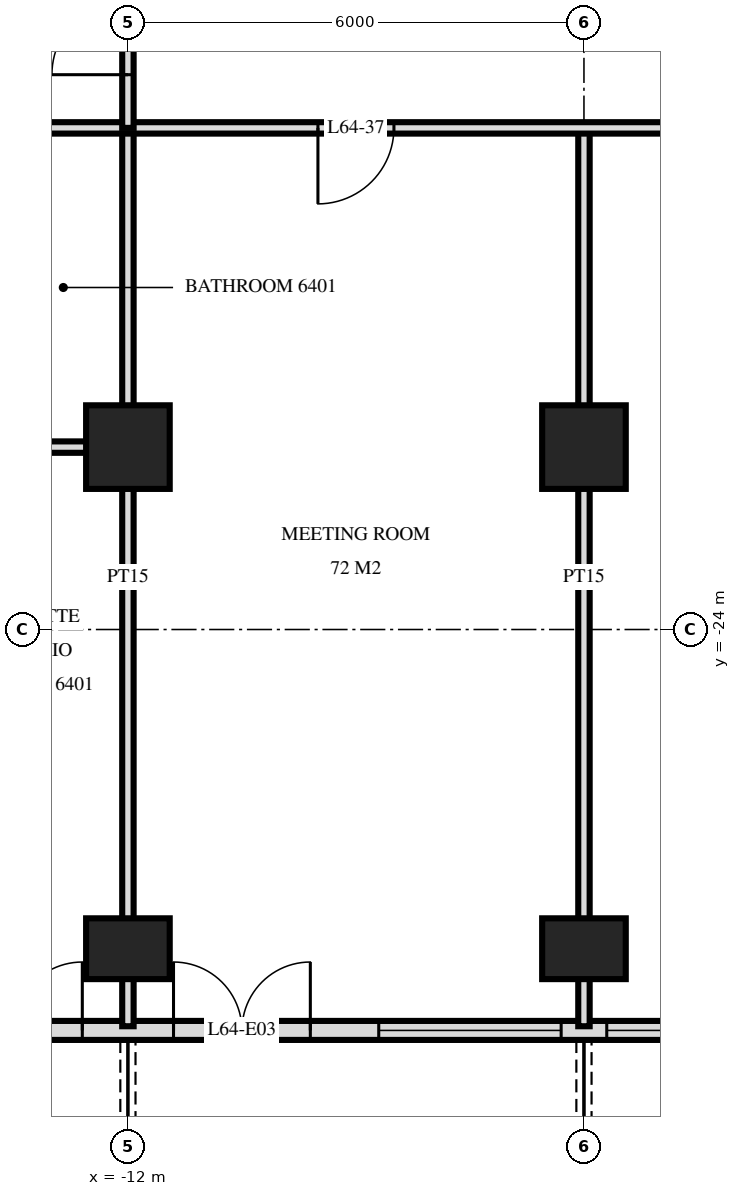
"""IFC4 building model, lengths in metres.
Left out: names, types, materials, properties, quantities, classifications, styles, units other than length and angle.
Written with IfcOpenShell. Run it as: python <this file> out.ifc"""

import sys

from ifc_helpers import new_model, si_unit, direction, frame, frame_2d, origin, origin_2d, place, context, subcontext, project, spatial, rectangle, extrude, element, fill, save


model = new_model("IFC4")
c1 = context("Model", 3, precision=1e-05, world=origin(), true_north=direction((0.0, 1.0)))
c2 = subcontext(c1, "Body", "Model", "MODEL_VIEW")
j1 = project(units=[si_unit("LENGTHUNIT", "METRE"), si_unit("PLANEANGLEUNIT", "RADIAN")], contexts=[c1])
p1 = place(None, origin())
s1 = spatial("IfcSite", under=j1, at=p1, CompositionType="ELEMENT")
p2 = place(p1, origin())
s2 = spatial("IfcBuilding", under=s1, at=p2, CompositionType="ELEMENT")
p3 = place(p2, frame((0.0, 0.0, 243.1)))
s3 = spatial("IfcBuildingStorey", under=s2, at=p3, CompositionType="ELEMENT", Elevation=243.1)
p4 = place(p3, frame((-12.0, -28.2, 0.0), z_axis=(0.0, 0.0, 1.0), x_axis=(1.0, 0.0, 0.0)))
e1 = element("IfcColumn", 1, at=p4, inside=s3, PredefinedType="COLUMN", context=c2, shape_type="SweptSolid", body=[
    extrude(rectangle(XDim=1.1, YDim=0.8, at=origin_2d()), origin(), (0.0, 0.0, 1.0), 3.5),
])
p5 = place(p3, frame((-12.0, -21.6, 0.0), z_axis=(0.0, 0.0, 1.0), x_axis=(1.0, 0.0, 0.0)))
e2 = element("IfcColumn", 2, at=p5, inside=s3, PredefinedType="COLUMN", context=c2, shape_type="SweptSolid", body=[
    extrude(rectangle(XDim=1.1, YDim=1.1, at=origin_2d()), origin(), (0.0, 0.0, 1.0), 3.5),
])
p6 = place(p3, frame((-6.0, -28.2, 0.0), z_axis=(0.0, 0.0, 1.0), x_axis=(1.0, 0.0, 0.0)))
e3 = element("IfcColumn", 3, at=p6, inside=s3, PredefinedType="COLUMN", context=c2, shape_type="SweptSolid", body=[
    extrude(rectangle(XDim=1.1, YDim=0.8, at=origin_2d()), origin(), (0.0, 0.0, 1.0), 3.5),
])
p7 = place(p3, frame((-6.0, -21.6, 0.0), z_axis=(0.0, 0.0, 1.0), x_axis=(1.0, 0.0, 0.0)))
e4 = element("IfcColumn", 4, at=p7, inside=s3, PredefinedType="COLUMN", context=c2, shape_type="SweptSolid", body=[
    extrude(rectangle(XDim=1.1, YDim=1.1, at=origin_2d()), origin(), (0.0, 0.0, 1.0), 3.5),
])
p8 = place(p3, frame((-22.475, -29.275, 0.0), z_axis=(0.0, 0.0, 1.0), x_axis=(1.0, 0.0, 0.0)))
e5 = element("IfcWall", 5, at=p8, inside=s3, PredefinedType="SOLIDWALL", context=c2, shape_type="SweptSolid", body=[
    extrude(rectangle(XDim=44.951, YDim=0.25, at=frame_2d((22.475, 0.0))), origin(), (0.0, 0.0, 1.0), 3.2),
])
p9 = place(p8, frame((0.575, 0.0, 0.0)))
e6 = element("IfcOpeningElement", 6, at=p9, cuts=e5, PredefinedType="OPENING", context=c2, shape_type="SweptSolid", body=[
    extrude(rectangle(XDim=1.8, YDim=2.4, at=frame_2d((0.9, 1.2))), frame((0.0, 0.135, 0.0), z_axis=(0.0, -1.0, 0.0), x_axis=(1.0, 0.0, 0.0)), (0.0, 0.0, 1.0), 0.27),
])
p10 = place(p8, frame((4.775, 0.0, 0.9)))
e7 = element("IfcOpeningElement", 7, at=p10, cuts=e5, PredefinedType="OPENING", context=c2, shape_type="SweptSolid", body=[
    extrude(rectangle(XDim=2.4, YDim=1.5, at=frame_2d((1.2, 0.75))), frame((0.0, 0.135, 0.0), z_axis=(0.0, -1.0, 0.0), x_axis=(1.0, 0.0, 0.0)), (0.0, 0.0, 1.0), 0.27),
])
p11 = place(p8, frame((8.075, 0.0, 0.0)))
e8 = element("IfcOpeningElement", 8, at=p11, cuts=e5, PredefinedType="OPENING", context=c2, shape_type="SweptSolid", body=[
    extrude(rectangle(XDim=1.8, YDim=2.4, at=frame_2d((0.9, 1.2))), frame((0.0, 0.135, 0.0), z_axis=(0.0, -1.0, 0.0), x_axis=(1.0, 0.0, 0.0)), (0.0, 0.0, 1.0), 0.27),
])
p12 = place(p8, frame((11.075, 0.0, 0.0)))
e9 = element("IfcOpeningElement", 9, at=p12, cuts=e5, PredefinedType="OPENING", context=c2, shape_type="SweptSolid", body=[
    extrude(rectangle(XDim=1.8, YDim=2.4, at=frame_2d((0.9, 1.2))), frame((0.0, 0.135, 0.0), z_axis=(0.0, -1.0, 0.0), x_axis=(1.0, 0.0, 0.0)), (0.0, 0.0, 1.0), 0.27),
])
p13 = place(p8, frame((13.775, 0.0, 0.9)))
e10 = element("IfcOpeningElement", 10, at=p13, cuts=e5, PredefinedType="OPENING", context=c2, shape_type="SweptSolid", body=[
    extrude(rectangle(XDim=2.4, YDim=1.5, at=frame_2d((1.2, 0.75))), frame((0.0, 0.135, 0.0), z_axis=(0.0, -1.0, 0.0), x_axis=(1.0, 0.0, 0.0)), (0.0, 0.0, 1.0), 0.27),
])
p14 = place(p8, frame((16.775, 0.0, 0.9)))
e11 = element("IfcOpeningElement", 11, at=p14, cuts=e5, PredefinedType="OPENING", context=c2, shape_type="SweptSolid", body=[
    extrude(rectangle(XDim=2.4, YDim=1.5, at=frame_2d((1.2, 0.75))), frame((0.0, 0.135, 0.0), z_axis=(0.0, -1.0, 0.0), x_axis=(1.0, 0.0, 0.0)), (0.0, 0.0, 1.0), 0.27),
])
p15 = place(p8, frame((20.075, 0.0, 0.0)))
e12 = element("IfcOpeningElement", 12, at=p15, cuts=e5, PredefinedType="OPENING", context=c2, shape_type="SweptSolid", body=[
    extrude(rectangle(XDim=1.8, YDim=2.4, at=frame_2d((0.9, 1.2))), frame((0.0, 0.135, 0.0), z_axis=(0.0, -1.0, 0.0), x_axis=(1.0, 0.0, 0.0)), (0.0, 0.0, 1.0), 0.27),
])
p16 = place(p8, frame((23.075, 0.0, 0.0)))
e13 = element("IfcOpeningElement", 13, at=p16, cuts=e5, PredefinedType="OPENING", context=c2, shape_type="SweptSolid", body=[
    extrude(rectangle(XDim=1.8, YDim=2.4, at=frame_2d((0.9, 1.2))), frame((0.0, 0.135, 0.0), z_axis=(0.0, -1.0, 0.0), x_axis=(1.0, 0.0, 0.0)), (0.0, 0.0, 1.0), 0.27),
])
p17 = place(p8, frame((25.775, 0.0, 0.9)))
e14 = element("IfcOpeningElement", 14, at=p17, cuts=e5, PredefinedType="OPENING", context=c2, shape_type="SweptSolid", body=[
    extrude(rectangle(XDim=2.4, YDim=1.5, at=frame_2d((1.2, 0.75))), frame((0.0, 0.135, 0.0), z_axis=(0.0, -1.0, 0.0), x_axis=(1.0, 0.0, 0.0)), (0.0, 0.0, 1.0), 0.27),
])
p18 = place(p8, frame((29.075, 0.0, 0.0)))
e15 = element("IfcOpeningElement", 15, at=p18, cuts=e5, PredefinedType="OPENING", context=c2, shape_type="SweptSolid", body=[
    extrude(rectangle(XDim=1.8, YDim=2.4, at=frame_2d((0.9, 1.2))), frame((0.0, 0.135, 0.0), z_axis=(0.0, -1.0, 0.0), x_axis=(1.0, 0.0, 0.0)), (0.0, 0.0, 1.0), 0.27),
])
p19 = place(p8, frame((31.775, 0.0, 0.9)))
e16 = element("IfcOpeningElement", 16, at=p19, cuts=e5, PredefinedType="OPENING", context=c2, shape_type="SweptSolid", body=[
    extrude(rectangle(XDim=2.4, YDim=1.5, at=frame_2d((1.2, 0.75))), frame((0.0, 0.135, 0.0), z_axis=(0.0, -1.0, 0.0), x_axis=(1.0, 0.0, 0.0)), (0.0, 0.0, 1.0), 0.27),
])
p20 = place(p8, frame((35.075, 0.0, 0.0)))
e17 = element("IfcOpeningElement", 17, at=p20, cuts=e5, PredefinedType="OPENING", context=c2, shape_type="SweptSolid", body=[
    extrude(rectangle(XDim=1.8, YDim=2.4, at=frame_2d((0.9, 1.2))), frame((0.0, 0.135, 0.0), z_axis=(0.0, -1.0, 0.0), x_axis=(1.0, 0.0, 0.0)), (0.0, 0.0, 1.0), 0.27),
])
p21 = place(p8, frame((41.075, 0.0, 0.0)))
e18 = element("IfcOpeningElement", 18, at=p21, cuts=e5, PredefinedType="OPENING", context=c2, shape_type="SweptSolid", body=[
    extrude(rectangle(XDim=1.8, YDim=2.4, at=frame_2d((0.9, 1.2))), frame((0.0, 0.135, 0.0), z_axis=(0.0, -1.0, 0.0), x_axis=(1.0, 0.0, 0.0)), (0.0, 0.0, 1.0), 0.27),
])
p22 = place(p3, frame((-6.0, -29.22, 0.0), z_axis=(0.0, 0.0, 1.0), x_axis=(0.0, 1.0, 0.0)))
e19 = element("IfcWall", 19, at=p22, inside=s3, PredefinedType="PARTITIONING", context=c2, shape_type="SweptSolid", body=[
    extrude(rectangle(XDim=11.82, YDim=0.15, at=frame_2d((5.91, 0.0))), origin(), (0.0, 0.0, 1.0), 3.22),
])
p23 = place(p3, frame((-12.0, -17.4, 0.0), z_axis=(0.0, 0.0, 1.0), x_axis=(0.0, 1.0, 0.0)))
e20 = element("IfcWall", 20, at=p23, inside=s3, PredefinedType="PARTITIONING", context=c2, shape_type="SweptSolid", body=[
    extrude(rectangle(XDim=2.35, YDim=0.15, at=frame_2d((1.175, 0.0))), origin(), (0.0, 0.0, 1.0), 3.22),
])
p24 = place(p23, frame((0.7, 0.0, 0.0)))
e21 = element("IfcOpeningElement", 21, at=p24, cuts=e20, PredefinedType="OPENING", context=c2, shape_type="SweptSolid", body=[
    extrude(rectangle(XDim=1.0, YDim=2.1, at=frame_2d((0.5, 1.05))), frame((0.0, 0.085, 0.0), z_axis=(0.0, -1.0, 0.0), x_axis=(1.0, 0.0, 0.0)), (0.0, 0.0, 1.0), 0.17),
])
p25 = place(p3, frame((-12.0, -29.22, 0.0), z_axis=(0.0, 0.0, 1.0), x_axis=(0.0, 1.0, 0.0)))
e22 = element("IfcWall", 22, at=p25, inside=s3, PredefinedType="PARTITIONING", context=c2, shape_type="SweptSolid", body=[
    extrude(rectangle(XDim=11.82, YDim=0.15, at=frame_2d((5.91, 0.0))), origin(), (0.0, 0.0, 1.0), 3.22),
])
p26 = place(p3, frame((-13.7, -21.6, 0.0), z_axis=(0.0, 0.0, 1.0), x_axis=(1.0, 0.0, 0.0)))
e23 = element("IfcWall", 23, at=p26, inside=s3, PredefinedType="PARTITIONING", context=c2, shape_type="SweptSolid", body=[
    extrude(rectangle(XDim=1.7, YDim=0.15, at=frame_2d((0.85, 0.0))), origin(), (0.0, 0.0, 1.0), 3.22),
])
p27 = place(p3, frame((-26.82, -17.4, 0.0), z_axis=(0.0, 0.0, 1.0), x_axis=(1.0, 0.0, 0.0)))
e24 = element("IfcWall", 24, at=p27, inside=s3, PredefinedType="PARTITIONING", context=c2, shape_type="SweptSolid", body=[
    extrude(rectangle(XDim=53.64, YDim=0.15, at=frame_2d((26.82, 0.0))), origin(), (0.0, 0.0, 1.0), 3.22),
])
p28 = place(p27, frame((11.97, 0.0, 0.0)))
e25 = element("IfcOpeningElement", 25, at=p28, cuts=e24, PredefinedType="OPENING", context=c2, shape_type="SweptSolid", body=[
    extrude(rectangle(XDim=1.0, YDim=2.1, at=frame_2d((0.5, 1.05))), frame((0.0, 0.085, 0.0), z_axis=(0.0, -1.0, 0.0), x_axis=(1.0, 0.0, 0.0)), (0.0, 0.0, 1.0), 0.17),
])
p29 = place(p27, frame((3.92, 0.0, 0.0)))
e26 = element("IfcOpeningElement", 26, at=p29, cuts=e24, PredefinedType="OPENING", context=c2, shape_type="SweptSolid", body=[
    extrude(rectangle(XDim=1.0, YDim=2.1, at=frame_2d((0.5, 1.05))), frame((0.0, 0.085, 0.0), z_axis=(0.0, -1.0, 0.0), x_axis=(1.0, 0.0, 0.0)), (0.0, 0.0, 1.0), 0.17),
])
p30 = place(p27, frame((5.72, 0.0, 0.0)))
e27 = element("IfcOpeningElement", 27, at=p30, cuts=e24, PredefinedType="OPENING", context=c2, shape_type="SweptSolid", body=[
    extrude(rectangle(XDim=1.0, YDim=2.1, at=frame_2d((0.5, 1.05))), frame((0.0, 0.085, 0.0), z_axis=(0.0, -1.0, 0.0), x_axis=(1.0, 0.0, 0.0)), (0.0, 0.0, 1.0), 0.17),
])
p31 = place(p27, frame((47.72, 0.0, 0.0)))
e28 = element("IfcOpeningElement", 28, at=p31, cuts=e24, PredefinedType="OPENING", context=c2, shape_type="SweptSolid", body=[
    extrude(rectangle(XDim=1.0, YDim=2.1, at=frame_2d((0.5, 1.05))), frame((0.0, 0.085, 0.0), z_axis=(0.0, -1.0, 0.0), x_axis=(1.0, 0.0, 0.0)), (0.0, 0.0, 1.0), 0.17),
])
p32 = place(p27, frame((51.02, 0.0, 0.0)))
e29 = element("IfcOpeningElement", 29, at=p32, cuts=e24, PredefinedType="OPENING", context=c2, shape_type="SweptSolid", body=[
    extrude(rectangle(XDim=1.0, YDim=2.1, at=frame_2d((0.5, 1.05))), frame((0.0, 0.085, 0.0), z_axis=(0.0, -1.0, 0.0), x_axis=(1.0, 0.0, 0.0)), (0.0, 0.0, 1.0), 0.17),
])
p33 = place(p27, frame((17.32, 0.0, 0.0)))
e30 = element("IfcOpeningElement", 30, at=p33, cuts=e24, PredefinedType="OPENING", context=c2, shape_type="SweptSolid", body=[
    extrude(rectangle(XDim=1.0, YDim=2.1, at=frame_2d((0.5, 1.05))), frame((0.0, 0.085, 0.0), z_axis=(0.0, -1.0, 0.0), x_axis=(1.0, 0.0, 0.0)), (0.0, 0.0, 1.0), 0.17),
])
p34 = place(p27, frame((23.32, 0.0, 0.0)))
e31 = element("IfcOpeningElement", 31, at=p34, cuts=e24, PredefinedType="OPENING", context=c2, shape_type="SweptSolid", body=[
    extrude(rectangle(XDim=1.0, YDim=2.1, at=frame_2d((0.5, 1.05))), frame((0.0, 0.085, 0.0), z_axis=(0.0, -1.0, 0.0), x_axis=(1.0, 0.0, 0.0)), (0.0, 0.0, 1.0), 0.17),
])
p35 = place(p27, frame((29.32, 0.0, 0.0)))
e32 = element("IfcOpeningElement", 32, at=p35, cuts=e24, PredefinedType="OPENING", context=c2, shape_type="SweptSolid", body=[
    extrude(rectangle(XDim=1.0, YDim=2.1, at=frame_2d((0.5, 1.05))), frame((0.0, 0.085, 0.0), z_axis=(0.0, -1.0, 0.0), x_axis=(1.0, 0.0, 0.0)), (0.0, 0.0, 1.0), 0.17),
])
p36 = place(p27, frame((35.32, 0.0, 0.0)))
e33 = element("IfcOpeningElement", 33, at=p36, cuts=e24, PredefinedType="OPENING", context=c2, shape_type="SweptSolid", body=[
    extrude(rectangle(XDim=1.0, YDim=2.1, at=frame_2d((0.5, 1.05))), frame((0.0, 0.085, 0.0), z_axis=(0.0, -1.0, 0.0), x_axis=(1.0, 0.0, 0.0)), (0.0, 0.0, 1.0), 0.17),
])
p37 = place(p11, origin())
e34 = element("IfcDoor", 34, at=p37, inside=s3, OperationType="DOUBLE_DOOR_SINGLE_SWING", PredefinedType="DOOR", context=c2, shape_type="SweptSolid", body=[
    extrude(rectangle(XDim=1.8, YDim=2.4, at=frame_2d((0.9, 1.2))), frame((0.0, 0.025, 0.0), z_axis=(0.0, -1.0, 0.0), x_axis=(1.0, 0.0, 0.0)), (0.0, 0.0, 1.0), 0.05),
])
fill(e8, e34)
p38 = place(p12, origin())
e35 = element("IfcDoor", 35, at=p38, inside=s3, OperationType="DOUBLE_DOOR_SINGLE_SWING", PredefinedType="DOOR", context=c2, shape_type="SweptSolid", body=[
    extrude(rectangle(XDim=1.8, YDim=2.4, at=frame_2d((0.9, 1.2))), frame((0.0, 0.025, 0.0), z_axis=(0.0, -1.0, 0.0), x_axis=(1.0, 0.0, 0.0)), (0.0, 0.0, 1.0), 0.05),
])
fill(e9, e35)
p39 = place(p13, origin())
e36 = element("IfcWindow", 36, at=p39, inside=s3, PartitioningType="SINGLE_PANEL", PredefinedType="WINDOW", context=c2, shape_type="SweptSolid", body=[
    extrude(rectangle(XDim=2.4, YDim=1.5, at=frame_2d((1.2, 0.75))), frame((0.0, 0.03, 0.0), z_axis=(0.0, -1.0, 0.0), x_axis=(1.0, 0.0, 0.0)), (0.0, 0.0, 1.0), 0.06),
])
fill(e10, e36)
p40 = place(p14, origin())
e37 = element("IfcWindow", 37, at=p40, inside=s3, PartitioningType="SINGLE_PANEL", PredefinedType="WINDOW", context=c2, shape_type="SweptSolid", body=[
    extrude(rectangle(XDim=2.4, YDim=1.5, at=frame_2d((1.2, 0.75))), frame((0.0, 0.03, 0.0), z_axis=(0.0, -1.0, 0.0), x_axis=(1.0, 0.0, 0.0)), (0.0, 0.0, 1.0), 0.06),
])
fill(e11, e37)
p41 = place(p24, origin())
e38 = element("IfcDoor", 38, at=p41, inside=s3, OperationType="SINGLE_SWING_RIGHT", PredefinedType="DOOR", context=c2, shape_type="SweptSolid", body=[
    extrude(rectangle(XDim=1.0, YDim=2.1, at=frame_2d((0.5, 1.05))), frame((0.0, 0.025, 0.0), z_axis=(0.0, -1.0, 0.0), x_axis=(1.0, 0.0, 0.0)), (0.0, 0.0, 1.0), 0.05),
])
fill(e21, e38)
p42 = place(p33, frame((0.5, 0.0, 0.0), z_axis=(0.0, 0.0, 1.0), x_axis=(-1.0, 0.0, 0.0)))
e39 = element("IfcDoor", 39, at=p42, inside=s3, OperationType="SINGLE_SWING_LEFT", PredefinedType="DOOR", context=c2, shape_type="SweptSolid", body=[
    extrude(rectangle(XDim=1.0, YDim=2.1, at=frame_2d((0.0, 1.05))), frame((0.0, -0.025, 0.0), z_axis=(0.0, 1.0, 0.0), x_axis=(-1.0, 0.0, 0.0)), (0.0, 0.0, 1.0), 0.05),
])
fill(e30, e39)
save(model, sys.argv[1])
